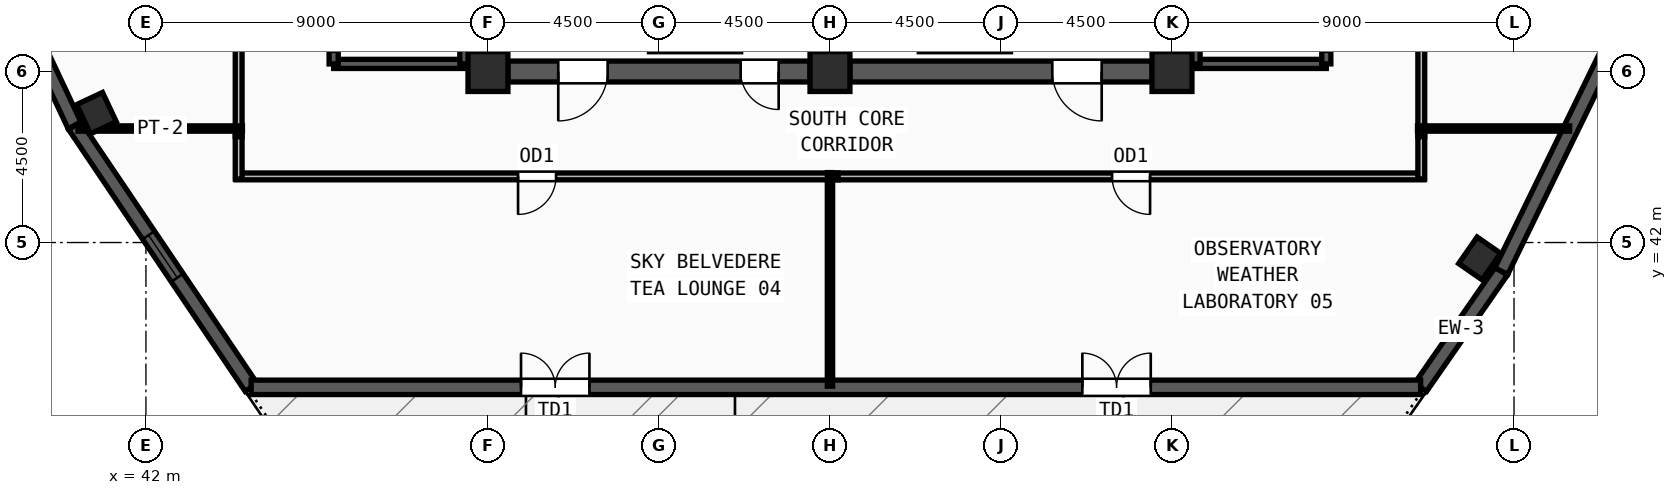
"""IFC4 building model, lengths in metres.
Left out: names, types, materials, properties, quantities, classifications, styles, units other than length and angle.
Written with IfcOpenShell. Run it as: python <this file> out.ifc"""

import sys

from ifc_helpers import new_model, si_unit, direction, frame, frame_2d, origin, origin_2d, place, context, subcontext, project, spatial, rectangle, extrude, source, transform, mapped, element, fill, save


model = new_model("IFC4")
c1 = context("Model", 3, precision=1e-05, world=origin(), true_north=direction((0.0, 1.0)))
c2 = subcontext(c1, "Body", "Model", "MODEL_VIEW")
j1 = project(units=[si_unit("LENGTHUNIT", "METRE"), si_unit("PLANEANGLEUNIT", "RADIAN")], contexts=[c1])
p1 = place(None, origin())
s1 = spatial("IfcSite", under=j1, at=p1, CompositionType="ELEMENT")
p2 = place(p1, origin())
s2 = spatial("IfcBuilding", under=s1, at=p2, CompositionType="ELEMENT")
p3 = place(p2, frame((0.0, 0.0, 355.8)))
s3 = spatial("IfcBuildingStorey", under=s2, at=p3, CompositionType="ELEMENT", Elevation=355.8)
m1 = source(origin(), c2, "Body", "SweptSolid", [
    extrude(rectangle(XDim=1.05, YDim=1.05, at=origin_2d()), origin(), (0.0, 0.0, 1.0), 4.8),
])
for number, where, z_axis, x_axis in (
    (1, (51.0, 46.5, 0.0), (0.0, 0.0, 1.0), (1.0, 0.0, 0.0)),
    (2, (60.0, 46.5, 0.0), (0.0, 0.0, 1.0), (1.0, 0.0, 0.0)),
    (3, (69.0, 46.5, 0.0), (0.0, 0.0, 1.0), (1.0, 0.0, 0.0)),
):
    element("IfcColumn", number, at=place(p3, frame(where, z_axis=z_axis, x_axis=x_axis)), inside=s3, PredefinedType="COLUMN", context=c2, shape_type="MappedRepresentation", body=[
        mapped(m1, transform((0.0, 0.0, 0.0), x_axis=(1.0, 0.0, 0.0), y_axis=(0.0, 1.0, 0.0), z_axis=(0.0, 0.0, 1.0), scale=1.0)),
    ])
m2 = source(origin(), c2, "Body", "SweptSolid", [
    extrude(rectangle(XDim=0.85, YDim=0.75, at=origin_2d()), origin(), (0.0, 0.0, 1.0), 4.8),
])
for number, where, z_axis, x_axis in (
    (4, (40.699, 45.405, 0.0), (0.0, 0.0, 1.0), (-0.426, 0.905, 0.0)),
    (5, (77.095, 41.582, 0.0), (0.0, 0.0, 1.0), (0.571, 0.821, 0.0)),
):
    element("IfcColumn", number, at=place(p3, frame(where, z_axis=z_axis, x_axis=x_axis)), inside=s3, PredefinedType="COLUMN", context=c2, shape_type="MappedRepresentation", body=[
        mapped(m2, transform((0.0, 0.0, 0.0), x_axis=(1.0, 0.0, 0.0), y_axis=(0.0, 1.0, 0.0), z_axis=(0.0, 0.0, 1.0), scale=1.0)),
    ])
p4 = place(p3, frame((75.542, 38.19, 0.0), z_axis=(0.0, 0.0, 1.0), x_axis=(0.570580153898, 0.821241918059, 0.0)))
e6 = element("IfcWall", 6, at=p4, inside=s3, PredefinedType="SOLIDWALL", context=c2, shape_type="SweptSolid", body=[
    extrude(rectangle(XDim=3.723, YDim=0.38, at=frame_2d((1.861, 0.0))), origin(), (0.0, 0.0, 1.0), 4.35),
])
p5 = place(p3, frame((77.666, 41.247, 0.0), z_axis=(0.0, 0.0, 1.0), x_axis=(0.438342251302, 0.898808138995, 0.0)))
e7 = element("IfcWall", 7, at=p5, inside=s3, PredefinedType="SOLIDWALL", context=c2, shape_type="SweptSolid", body=[
    extrude(rectangle(XDim=26.716, YDim=0.38, at=frame_2d((13.358, 0.0))), origin(), (0.0, 0.0, 1.0), 4.35),
])
m3 = source(origin(), c2, "Body", "SweptSolid", [
    extrude(rectangle(XDim=1.35, YDim=1.85, at=frame_2d((0.675, 0.925))), frame((0.0, 0.2, 0.0), z_axis=(0.0, -1.0, 0.0), x_axis=(1.0, 0.0, 0.0)), (0.0, 0.0, 1.0), 0.4),
])
p6 = place(p5, frame((12.683, 0.0, 0.55)))
e8 = element("IfcOpeningElement", 8, at=p6, cuts=e7, PredefinedType="OPENING", context=c2, shape_type="MappedRepresentation", body=[
    mapped(m3, transform((0.0, 0.0, 0.0), x_axis=(1.0, 0.0, 0.0), y_axis=(0.0, 1.0, 0.0), z_axis=(0.0, 0.0, 1.0), scale=1.0)),
])
p7 = place(p3, frame((30.621, 65.258, 0.0), z_axis=(0.0, 0.0, 1.0), x_axis=(0.426031057179, -0.904708537773, 0.0)))
e9 = element("IfcWall", 9, at=p7, inside=s3, PredefinedType="SOLIDWALL", context=c2, shape_type="SweptSolid", body=[
    extrude(rectangle(XDim=22.306, YDim=0.38, at=frame_2d((11.153, 0.0))), origin(), (0.0, 0.0, 1.0), 4.35),
])
p8 = place(p7, frame((10.478, 0.0, 0.55)))
e10 = element("IfcOpeningElement", 10, at=p8, cuts=e9, PredefinedType="OPENING", context=c2, shape_type="MappedRepresentation", body=[
    mapped(m3, transform((0.0, 0.0, 0.0), x_axis=(1.0, 0.0, 0.0), y_axis=(0.0, 1.0, 0.0), z_axis=(0.0, 0.0, 1.0), scale=1.0)),
])
p9 = place(p3, frame((40.124, 45.078, 0.0), z_axis=(0.0, 0.0, 1.0), x_axis=(0.559113952573, -0.829090820138, 0.0)))
e11 = element("IfcWall", 11, at=p9, inside=s3, PredefinedType="SOLIDWALL", context=c2, shape_type="SweptSolid", body=[
    extrude(rectangle(XDim=8.308, YDim=0.38, at=frame_2d((4.154, 0.0))), origin(), (0.0, 0.0, 1.0), 4.35),
])
p10 = place(p9, frame((3.479, 0.0, 0.55)))
e12 = element("IfcOpeningElement", 12, at=p10, cuts=e11, PredefinedType="OPENING", context=c2, shape_type="MappedRepresentation", body=[
    mapped(m3, transform((0.0, 0.0, 0.0), x_axis=(1.0, 0.0, 0.0), y_axis=(0.0, 1.0, 0.0), z_axis=(0.0, 0.0, 1.0), scale=1.0)),
])
p11 = place(p3, frame((44.769, 38.19, 0.0), z_axis=(0.0, 0.0, 1.0), x_axis=(1.0, 0.0, 0.0)))
e13 = element("IfcWall", 13, at=p11, inside=s3, PredefinedType="SOLIDWALL", context=c2, shape_type="SweptSolid", body=[
    extrude(rectangle(XDim=30.773, YDim=0.38, at=frame_2d((15.386, 0.0))), origin(), (0.0, 0.0, 1.0), 4.35),
])
m4 = source(origin(), c2, "Body", "SweptSolid", [
    extrude(rectangle(XDim=1.8, YDim=2.3, at=frame_2d((0.9, 1.15))), frame((0.0, 0.2, 0.0), z_axis=(0.0, -1.0, 0.0), x_axis=(1.0, 0.0, 0.0)), (0.0, 0.0, 1.0), 0.4),
])
p12 = place(p11, frame((7.101, 0.0, 0.0)))
e14 = element("IfcOpeningElement", 14, at=p12, cuts=e13, PredefinedType="OPENING", context=c2, shape_type="MappedRepresentation", body=[
    mapped(m4, transform((0.0, 0.0, 0.0), x_axis=(1.0, 0.0, 0.0), y_axis=(0.0, 1.0, 0.0), z_axis=(0.0, 0.0, 1.0), scale=1.0)),
])
p13 = place(p11, frame((21.872, 0.0, 0.0)))
e15 = element("IfcOpeningElement", 15, at=p13, cuts=e13, PredefinedType="OPENING", context=c2, shape_type="MappedRepresentation", body=[
    mapped(m4, transform((0.0, 0.0, 0.0), x_axis=(1.0, 0.0, 0.0), y_axis=(0.0, 1.0, 0.0), z_axis=(0.0, 0.0, 1.0), scale=1.0)),
])
p14 = place(p3, frame((68.475, 46.5, 0.0), z_axis=(0.0, 0.0, 1.0), x_axis=(-1.0, 0.0, 0.0)))
e16 = element("IfcWall", 16, at=p14, inside=s3, PredefinedType="SHEAR", context=c2, shape_type="SweptSolid", body=[
    extrude(rectangle(XDim=7.95, YDim=0.55, at=frame_2d((3.975, 0.0))), origin(), (0.0, 0.0, 1.0), 4.35),
])
m5 = source(origin(), c2, "Body", "SweptSolid", [
    extrude(rectangle(XDim=1.3, YDim=2.2, at=frame_2d((0.65, 1.1))), frame((0.0, 0.285, 0.0), z_axis=(0.0, -1.0, 0.0), x_axis=(1.0, 0.0, 0.0)), (0.0, 0.0, 1.0), 0.57),
])
p15 = place(p14, frame((1.325, 0.0, 0.0)))
e17 = element("IfcOpeningElement", 17, at=p15, cuts=e16, PredefinedType="OPENING", context=c2, shape_type="MappedRepresentation", body=[
    mapped(m5, transform((0.0, 0.0, 0.0), x_axis=(1.0, 0.0, 0.0), y_axis=(0.0, 1.0, 0.0), z_axis=(0.0, 0.0, 1.0), scale=1.0)),
])
p16 = place(p3, frame((59.475, 46.5, 0.0), z_axis=(0.0, 0.0, 1.0), x_axis=(-1.0, 0.0, 0.0)))
e18 = element("IfcWall", 18, at=p16, inside=s3, PredefinedType="SHEAR", context=c2, shape_type="SweptSolid", body=[
    extrude(rectangle(XDim=7.95, YDim=0.55, at=frame_2d((3.975, 0.0))), origin(), (0.0, 0.0, 1.0), 4.35),
])
p17 = place(p16, frame((5.325, 0.0, 0.0)))
e19 = element("IfcOpeningElement", 19, at=p17, cuts=e18, PredefinedType="OPENING", context=c2, shape_type="MappedRepresentation", body=[
    mapped(m5, transform((0.0, 0.0, 0.0), x_axis=(1.0, 0.0, 0.0), y_axis=(0.0, 1.0, 0.0), z_axis=(0.0, 0.0, 1.0), scale=1.0)),
])
m6 = source(origin(), c2, "Body", "SweptSolid", [
    extrude(rectangle(XDim=1.0, YDim=2.2, at=frame_2d((0.5, 1.1))), frame((0.0, 0.285, 0.0), z_axis=(0.0, -1.0, 0.0), x_axis=(1.0, 0.0, 0.0)), (0.0, 0.0, 1.0), 0.57),
])
p18 = place(p16, frame((0.825, 0.0, 0.0)))
e20 = element("IfcOpeningElement", 20, at=p18, cuts=e18, PredefinedType="OPENING", context=c2, shape_type="MappedRepresentation", body=[
    mapped(m6, transform((0.0, 0.0, 0.0), x_axis=(1.0, 0.0, 0.0), y_axis=(0.0, 1.0, 0.0), z_axis=(0.0, 0.0, 1.0), scale=1.0)),
])
p19 = place(p3, frame((46.94, 46.7, 0.0), z_axis=(0.0, 0.0, 1.0), x_axis=(1.0, 0.0, 0.0)))
e21 = element("IfcWall", 21, at=p19, inside=s3, PredefinedType="SOLIDWALL", context=c2, shape_type="SweptSolid", body=[
    extrude(rectangle(XDim=3.44, YDim=0.24, at=frame_2d((1.72, 0.0))), origin(), (0.0, 0.0, 1.0), 4.35),
])
p20 = place(p3, frame((50.38, 46.7, 0.0), z_axis=(0.0, 0.0, 1.0), x_axis=(0.0, 1.0, 0.0)))
e22 = element("IfcWall", 22, at=p20, inside=s3, PredefinedType="SOLIDWALL", context=c2, shape_type="SweptSolid", body=[
    extrude(rectangle(XDim=7.82, YDim=0.24, at=frame_2d((3.91, 0.0))), origin(), (0.0, 0.0, 1.0), 4.35),
])
p21 = place(p3, frame((46.94, 54.52, 0.0), z_axis=(0.0, 0.0, 1.0), x_axis=(0.0, -1.0, 0.0)))
e23 = element("IfcWall", 23, at=p21, inside=s3, PredefinedType="SOLIDWALL", context=c2, shape_type="SweptSolid", body=[
    extrude(rectangle(XDim=7.82, YDim=0.24, at=frame_2d((3.91, 0.0))), origin(), (0.0, 0.0, 1.0), 4.35),
])
m7 = source(origin(), c2, "Body", "SweptSolid", [
    extrude(rectangle(XDim=1.2, YDim=2.2, at=frame_2d((0.6, 1.1))), frame((0.0, 0.13, 0.0), z_axis=(0.0, -1.0, 0.0), x_axis=(1.0, 0.0, 0.0)), (0.0, 0.0, 1.0), 0.26),
])
p22 = place(p21, frame((6.3, 0.0, 0.0)))
e24 = element("IfcOpeningElement", 24, at=p22, cuts=e23, PredefinedType="OPENING", context=c2, shape_type="MappedRepresentation", body=[
    mapped(m7, transform((0.0, 0.0, 0.0), x_axis=(1.0, 0.0, 0.0), y_axis=(0.0, 1.0, 0.0), z_axis=(0.0, 0.0, 1.0), scale=1.0)),
])
p23 = place(p3, frame((69.62, 46.7, 0.0), z_axis=(0.0, 0.0, 1.0), x_axis=(1.0, 0.0, 0.0)))
e25 = element("IfcWall", 25, at=p23, inside=s3, PredefinedType="SOLIDWALL", context=c2, shape_type="SweptSolid", body=[
    extrude(rectangle(XDim=3.44, YDim=0.24, at=frame_2d((1.72, 0.0))), origin(), (0.0, 0.0, 1.0), 4.35),
])
p24 = place(p3, frame((73.06, 46.7, 0.0), z_axis=(0.0, 0.0, 1.0), x_axis=(0.0, 1.0, 0.0)))
e26 = element("IfcWall", 26, at=p24, inside=s3, PredefinedType="SOLIDWALL", context=c2, shape_type="SweptSolid", body=[
    extrude(rectangle(XDim=7.82, YDim=0.24, at=frame_2d((3.91, 0.0))), origin(), (0.0, 0.0, 1.0), 4.35),
])
p25 = place(p24, frame((0.32, 0.0, 0.0)))
e27 = element("IfcOpeningElement", 27, at=p25, cuts=e26, PredefinedType="OPENING", context=c2, shape_type="MappedRepresentation", body=[
    mapped(m7, transform((0.0, 0.0, 0.0), x_axis=(1.0, 0.0, 0.0), y_axis=(0.0, 1.0, 0.0), z_axis=(0.0, 0.0, 1.0), scale=1.0)),
])
p26 = place(p3, frame((69.62, 54.52, 0.0), z_axis=(0.0, 0.0, 1.0), x_axis=(0.0, -1.0, 0.0)))
e28 = element("IfcWall", 28, at=p26, inside=s3, PredefinedType="SOLIDWALL", context=c2, shape_type="SweptSolid", body=[
    extrude(rectangle(XDim=7.82, YDim=0.24, at=frame_2d((3.91, 0.0))), origin(), (0.0, 0.0, 1.0), 4.35),
])
p27 = place(p3, frame((75.56, 67.98, 0.0), z_axis=(0.0, 0.0, 1.0), x_axis=(0.0, -1.0, 0.0)))
e29 = element("IfcWall", 29, at=p27, inside=s3, PredefinedType="PARTITIONING", context=c2, shape_type="SweptSolid", body=[
    extrude(rectangle(XDim=23.195, YDim=0.18, at=frame_2d((11.598, 0.0))), origin(), (0.0, 0.0, 1.0), 4.35),
])
m8 = source(origin(), c2, "Body", "SweptSolid", [
    extrude(rectangle(XDim=1.5, YDim=2.2, at=frame_2d((0.75, 1.1))), frame((0.0, 0.1, 0.0), z_axis=(0.0, -1.0, 0.0), x_axis=(1.0, 0.0, 0.0)), (0.0, 0.0, 1.0), 0.2),
])
p28 = place(p27, frame((10.848, 0.0, 0.0)))
e30 = element("IfcOpeningElement", 30, at=p28, cuts=e29, PredefinedType="OPENING", context=c2, shape_type="MappedRepresentation", body=[
    mapped(m8, transform((0.0, 0.0, 0.0), x_axis=(1.0, 0.0, 0.0), y_axis=(0.0, 1.0, 0.0), z_axis=(0.0, 0.0, 1.0), scale=1.0)),
])
p29 = place(p3, frame((44.44, 44.785, 0.0), z_axis=(0.0, 0.0, 1.0), x_axis=(0.0, 1.0, 0.0)))
e31 = element("IfcWall", 31, at=p29, inside=s3, PredefinedType="PARTITIONING", context=c2, shape_type="SweptSolid", body=[
    extrude(rectangle(XDim=11.555, YDim=0.18, at=frame_2d((5.778, 0.0))), origin(), (0.0, 0.0, 1.0), 3.985),
])
p30 = place(p29, frame((5.028, 0.0, 0.0)))
e32 = element("IfcOpeningElement", 32, at=p30, cuts=e31, PredefinedType="OPENING", context=c2, shape_type="MappedRepresentation", body=[
    mapped(m8, transform((0.0, 0.0, 0.0), x_axis=(1.0, 0.0, 0.0), y_axis=(0.0, 1.0, 0.0), z_axis=(0.0, 0.0, 1.0), scale=1.0)),
])
p31 = place(p3, frame((60.215, 43.74, 0.0), z_axis=(0.0, 0.0, 1.0), x_axis=(-1.0, 0.0, 0.0)))
e33 = element("IfcWall", 33, at=p31, inside=s3, PredefinedType="PARTITIONING", context=c2, shape_type="SweptSolid", body=[
    extrude(rectangle(XDim=15.845, YDim=0.18, at=frame_2d((7.922, 0.0))), origin(), (0.0, 0.0, 1.0), 4.35),
])
m9 = source(origin(), c2, "Body", "SweptSolid", [
    extrude(rectangle(XDim=1.0, YDim=2.2, at=frame_2d((0.5, 1.1))), frame((0.0, 0.1, 0.0), z_axis=(0.0, -1.0, 0.0), x_axis=(1.0, 0.0, 0.0)), (0.0, 0.0, 1.0), 0.2),
])
p32 = place(p31, frame((7.423, 0.0, 0.0)))
e34 = element("IfcOpeningElement", 34, at=p32, cuts=e33, PredefinedType="OPENING", context=c2, shape_type="MappedRepresentation", body=[
    mapped(m9, transform((0.0, 0.0, 0.0), x_axis=(1.0, 0.0, 0.0), y_axis=(0.0, 1.0, 0.0), z_axis=(0.0, 0.0, 1.0), scale=1.0)),
])
p33 = place(p3, frame((75.63, 43.74, 0.0), z_axis=(0.0, 0.0, 1.0), x_axis=(-1.0, 0.0, 0.0)))
e35 = element("IfcWall", 35, at=p33, inside=s3, PredefinedType="PARTITIONING", context=c2, shape_type="SweptSolid", body=[
    extrude(rectangle(XDim=15.415, YDim=0.18, at=frame_2d((7.708, 0.0))), origin(), (0.0, 0.0, 1.0), 4.35),
])
p34 = place(p33, frame((7.207, 0.0, 0.0)))
e36 = element("IfcOpeningElement", 36, at=p34, cuts=e35, PredefinedType="OPENING", context=c2, shape_type="MappedRepresentation", body=[
    mapped(m9, transform((0.0, 0.0, 0.0), x_axis=(1.0, 0.0, 0.0), y_axis=(0.0, 1.0, 0.0), z_axis=(0.0, 0.0, 1.0), scale=1.0)),
])
for number, where, z_axis, x_axis in (
    (37, (44.44, 43.67, 0.0), (0.0, 0.0, 1.0), (0.0, 1.0, 0.0)),
    (38, (75.56, 44.785, 0.0), (0.0, 0.0, 1.0), (0.0, -1.0, 0.0)),
):
    element("IfcWall", number, at=place(p3, frame(where, z_axis=z_axis, x_axis=x_axis)), inside=s3, PredefinedType="PARTITIONING", context=c2, shape_type="SweptSolid", body=[
        extrude(rectangle(XDim=1.115, YDim=0.18, at=frame_2d((0.558, 0.0))), origin(), (0.0, 0.0, 1.0), 4.35),
    ])
p35 = place(p3, frame((44.54, 45.0, 0.0), z_axis=(0.0, 0.0, 1.0), x_axis=(-1.0, 0.0, 0.0)))
e39 = element("IfcWall", 39, at=p35, inside=s3, PredefinedType="PARTITIONING", context=c2, shape_type="SweptSolid", body=[
    extrude(rectangle(XDim=4.327, YDim=0.14, at=frame_2d((2.164, 0.0))), origin(), (0.0, 0.0, 1.0), 4.35),
])
p36 = place(p3, frame((75.46, 45.0, 0.0), z_axis=(0.0, 0.0, 1.0), x_axis=(1.0, 0.0, 0.0)))
e40 = element("IfcWall", 40, at=p36, inside=s3, PredefinedType="PARTITIONING", context=c2, shape_type="SweptSolid", body=[
    extrude(rectangle(XDim=4.003, YDim=0.14, at=frame_2d((2.001, 0.0))), origin(), (0.0, 0.0, 1.0), 4.35),
])
p37 = place(p3, frame((60.0, 43.84, 0.0), z_axis=(0.0, 0.0, 1.0), x_axis=(0.0, -1.0, 0.0)))
e41 = element("IfcWall", 41, at=p37, inside=s3, PredefinedType="PARTITIONING", context=c2, shape_type="SweptSolid", body=[
    extrude(rectangle(XDim=5.62, YDim=0.14, at=frame_2d((2.81, 0.0))), origin(), (0.0, 0.0, 1.0), 3.747),
])
m10 = source(origin(), c2, "Body", "SweptSolid", [
    extrude(rectangle(XDim=1.35, YDim=1.85, at=frame_2d((0.675, 0.925))), frame((0.0, 0.03, 0.0), z_axis=(0.0, -1.0, 0.0), x_axis=(1.0, 0.0, 0.0)), (0.0, 0.0, 1.0), 0.06),
])
p38 = place(p10, origin())
e42 = element("IfcWindow", 42, at=p38, inside=s3, PartitioningType="SINGLE_PANEL", PredefinedType="WINDOW", context=c2, shape_type="MappedRepresentation", body=[
    mapped(m10, transform((0.0, 0.0, 0.0), x_axis=(1.0, 0.0, 0.0), y_axis=(0.0, 1.0, 0.0), z_axis=(0.0, 0.0, 1.0), scale=1.0)),
])
fill(e12, e42)
m11 = source(origin(), c2, "Body", "SweptSolid", [
    extrude(rectangle(XDim=1.8, YDim=2.3, at=frame_2d((0.9, 1.15))), frame((0.0, 0.025, 0.0), z_axis=(0.0, -1.0, 0.0), x_axis=(1.0, 0.0, 0.0)), (0.0, 0.0, 1.0), 0.05),
])
p39 = place(p12, origin())
e43 = element("IfcDoor", 43, at=p39, inside=s3, OperationType="DOUBLE_DOOR_SINGLE_SWING", PredefinedType="DOOR", context=c2, shape_type="MappedRepresentation", body=[
    mapped(m11, transform((0.0, 0.0, 0.0), x_axis=(1.0, 0.0, 0.0), y_axis=(0.0, 1.0, 0.0), z_axis=(0.0, 0.0, 1.0), scale=1.0)),
])
fill(e14, e43)
p40 = place(p13, origin())
e44 = element("IfcDoor", 44, at=p40, inside=s3, OperationType="DOUBLE_DOOR_SINGLE_SWING", PredefinedType="DOOR", context=c2, shape_type="MappedRepresentation", body=[
    mapped(m11, transform((0.0, 0.0, 0.0), x_axis=(1.0, 0.0, 0.0), y_axis=(0.0, 1.0, 0.0), z_axis=(0.0, 0.0, 1.0), scale=1.0)),
])
fill(e15, e44)
m12 = source(origin(), c2, "Body", "SweptSolid", [
    extrude(rectangle(XDim=1.3, YDim=2.2, at=frame_2d((0.65, 1.1))), frame((0.0, 0.025, 0.0), z_axis=(0.0, -1.0, 0.0), x_axis=(1.0, 0.0, 0.0)), (0.0, 0.0, 1.0), 0.05),
])
p41 = place(p17, origin())
e45 = element("IfcDoor", 45, at=p41, inside=s3, OperationType="SINGLE_SWING_RIGHT", PredefinedType="DOOR", context=c2, shape_type="MappedRepresentation", body=[
    mapped(m12, transform((0.0, 0.0, 0.0), x_axis=(1.0, 0.0, 0.0), y_axis=(0.0, 1.0, 0.0), z_axis=(0.0, 0.0, 1.0), scale=1.0)),
])
fill(e19, e45)
m13 = source(origin(), c2, "Body", "SweptSolid", [
    extrude(rectangle(XDim=1.0, YDim=2.2, at=frame_2d((0.5, 1.1))), frame((0.0, 0.025, 0.0), z_axis=(0.0, -1.0, 0.0), x_axis=(1.0, 0.0, 0.0)), (0.0, 0.0, 1.0), 0.05),
])
p42 = place(p18, origin())
e46 = element("IfcDoor", 46, at=p42, inside=s3, OperationType="SINGLE_SWING_LEFT", PredefinedType="DOOR", context=c2, shape_type="MappedRepresentation", body=[
    mapped(m13, transform((0.0, 0.0, 0.0), x_axis=(1.0, 0.0, 0.0), y_axis=(0.0, 1.0, 0.0), z_axis=(0.0, 0.0, 1.0), scale=1.0)),
])
fill(e20, e46)
p43 = place(p15, origin())
e47 = element("IfcDoor", 47, at=p43, inside=s3, OperationType="SINGLE_SWING_LEFT", PredefinedType="DOOR", context=c2, shape_type="MappedRepresentation", body=[
    mapped(m12, transform((0.0, 0.0, 0.0), x_axis=(1.0, 0.0, 0.0), y_axis=(0.0, 1.0, 0.0), z_axis=(0.0, 0.0, 1.0), scale=1.0)),
])
fill(e17, e47)
p44 = place(p32, origin())
e48 = element("IfcDoor", 48, at=p44, inside=s3, OperationType="SINGLE_SWING_RIGHT", PredefinedType="DOOR", context=c2, shape_type="MappedRepresentation", body=[
    mapped(m13, transform((0.0, 0.0, 0.0), x_axis=(1.0, 0.0, 0.0), y_axis=(0.0, 1.0, 0.0), z_axis=(0.0, 0.0, 1.0), scale=1.0)),
])
fill(e34, e48)
p45 = place(p34, origin())
e49 = element("IfcDoor", 49, at=p45, inside=s3, OperationType="SINGLE_SWING_LEFT", PredefinedType="DOOR", context=c2, shape_type="MappedRepresentation", body=[
    mapped(m13, transform((0.0, 0.0, 0.0), x_axis=(1.0, 0.0, 0.0), y_axis=(0.0, 1.0, 0.0), z_axis=(0.0, 0.0, 1.0), scale=1.0)),
])
fill(e36, e49)
save(model, sys.argv[1])
